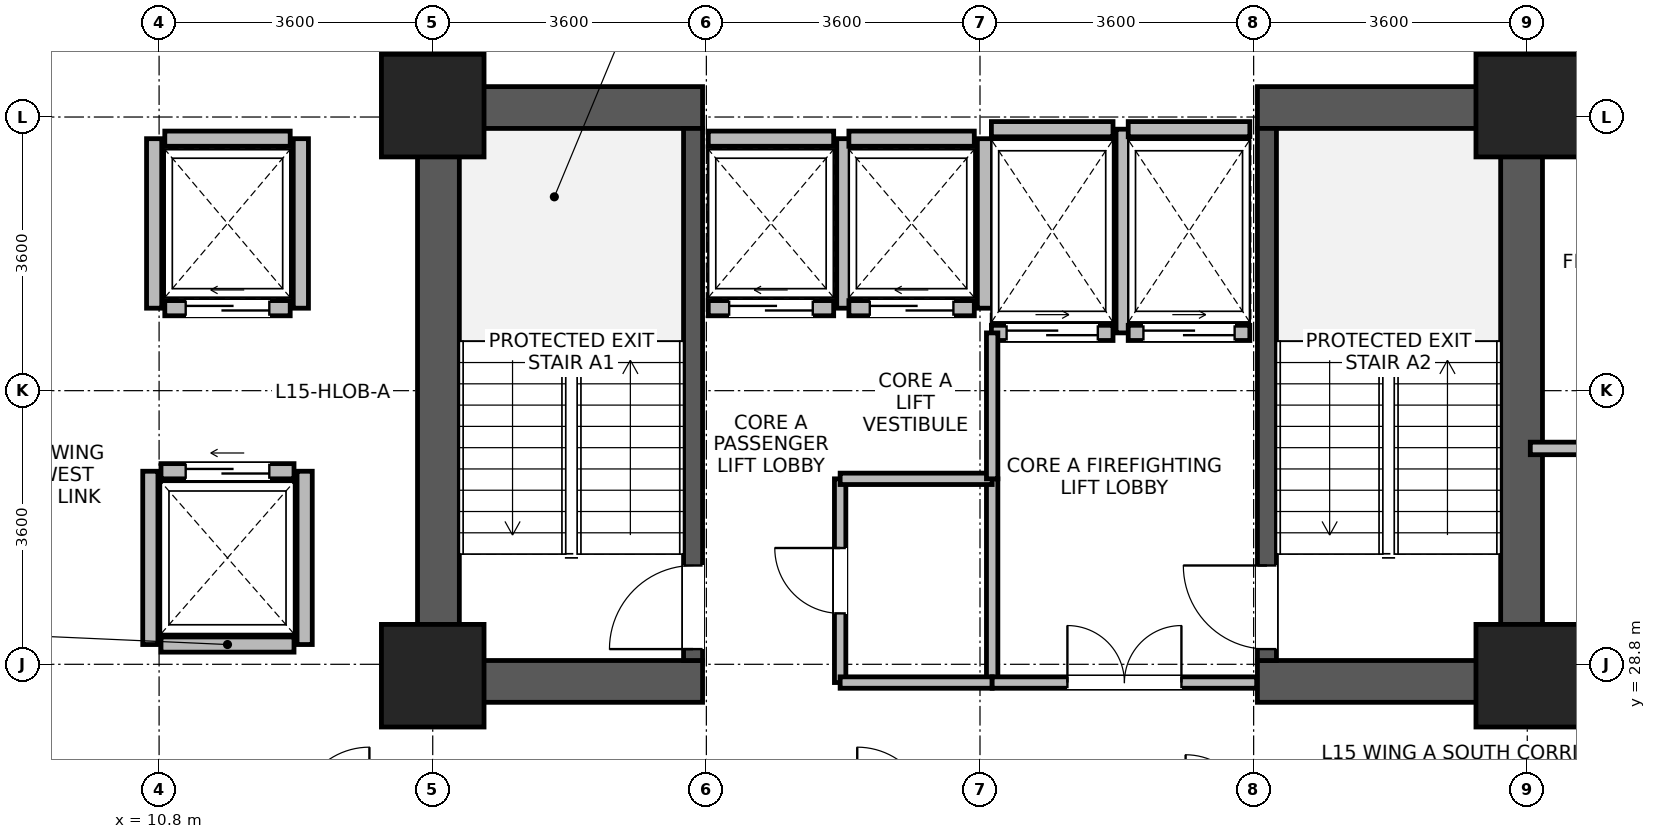
"""IFC4 building model, lengths in metres.
Left out: names, types, materials, properties, quantities, classifications, styles, units other than length and angle.
Written with IfcOpenShell. Run it as: python <this file> out.ifc"""

import sys

from ifc_helpers import new_model, si_unit, direction, frame, frame_2d, origin, origin_2d, place, context, subcontext, project, spatial, rectangle, extrude, source, transform, mapped, element, fill, save


model = new_model("IFC4")
c1 = context("Model", 3, precision=1e-05, world=origin(), true_north=direction((0.0, 1.0)))
c2 = subcontext(c1, "Body", "Model", "MODEL_VIEW")
j1 = project(units=[si_unit("LENGTHUNIT", "METRE"), si_unit("PLANEANGLEUNIT", "RADIAN")], contexts=[c1])
p1 = place(None, origin())
s1 = spatial("IfcSite", under=j1, at=p1, CompositionType="ELEMENT")
p2 = place(p1, origin())
s2 = spatial("IfcBuilding", under=s1, at=p2, CompositionType="ELEMENT")
p3 = place(p2, frame((0.0, 0.0, 62.3)))
s3 = spatial("IfcBuildingStorey", under=s2, at=p3, CompositionType="ELEMENT", Elevation=62.3)
for number, where, z_axis, x_axis in (
    (1, (14.475, 28.3, 0.0), (0.0, 0.0, 1.0), (0.0, 1.0, 0.0)),
    (2, (28.725, 28.3, 0.0), (0.0, 0.0, 1.0), (0.0, 1.0, 0.0)),
):
    element("IfcWall", number, at=place(p3, frame(where, z_axis=z_axis, x_axis=x_axis)), inside=s3, PredefinedType="SHEAR", context=c2, shape_type="SweptSolid", body=[
        extrude(rectangle(XDim=8.1, YDim=0.55, at=frame_2d((4.05, 0.0))), origin(), (0.0, 0.0, 1.0), 3.45),
    ])
for number, where, z_axis, x_axis in (
    (3, (14.75, 28.575, 0.0), (0.0, 0.0, 1.0), (1.0, 0.0, 0.0)),
    (4, (25.25, 28.575, 0.0), (0.0, 0.0, 1.0), (1.0, 0.0, 0.0)),
    (5, (14.75, 36.125, 0.0), (0.0, 0.0, 1.0), (1.0, 0.0, 0.0)),
    (6, (25.25, 36.125, 0.0), (0.0, 0.0, 1.0), (1.0, 0.0, 0.0)),
):
    element("IfcWall", number, at=place(p3, frame(where, z_axis=z_axis, x_axis=x_axis)), inside=s3, PredefinedType="SHEAR", context=c2, shape_type="SweptSolid", body=[
        extrude(rectangle(XDim=3.2, YDim=0.55, at=frame_2d((1.6, 0.0))), origin(), (0.0, 0.0, 1.0), 3.45),
    ])
p4 = place(p3, frame((17.825, 28.85, 0.0), z_axis=(0.0, 0.0, 1.0), x_axis=(0.0, 1.0, 0.0)))
e7 = element("IfcWall", 7, at=p4, inside=s3, PredefinedType="SHEAR", context=c2, shape_type="SweptSolid", body=[
    extrude(rectangle(XDim=7.0, YDim=0.25, at=frame_2d((3.5, 0.0))), origin(), (0.0, 0.0, 1.0), 3.45),
])
p5 = place(p4, frame((0.15, 0.0, 0.0)))
e8 = element("IfcOpeningElement", 8, at=p5, cuts=e7, PredefinedType="OPENING", context=c2, shape_type="SweptSolid", body=[
    extrude(rectangle(XDim=1.1, YDim=2.08, at=frame_2d((0.55, 1.04))), frame((0.0, 0.135, 0.0), z_axis=(0.0, -1.0, 0.0), x_axis=(1.0, 0.0, 0.0)), (0.0, 0.0, 1.0), 0.27),
])
p6 = place(p3, frame((25.375, 28.85, 0.0), z_axis=(0.0, 0.0, 1.0), x_axis=(0.0, 1.0, 0.0)))
e9 = element("IfcWall", 9, at=p6, inside=s3, PredefinedType="SHEAR", context=c2, shape_type="SweptSolid", body=[
    extrude(rectangle(XDim=7.0, YDim=0.25, at=frame_2d((3.5, 0.0))), origin(), (0.0, 0.0, 1.0), 3.45),
])
p7 = place(p6, frame((0.15, 0.0, 0.0)))
e10 = element("IfcOpeningElement", 10, at=p7, cuts=e9, PredefinedType="OPENING", context=c2, shape_type="SweptSolid", body=[
    extrude(rectangle(XDim=1.1, YDim=2.08, at=frame_2d((0.55, 1.04))), frame((0.0, 0.135, 0.0), z_axis=(0.0, -1.0, 0.0), x_axis=(1.0, 0.0, 0.0)), (0.0, 0.0, 1.0), 0.27),
])
m1 = source(origin(), c2, "Body", "SweptSolid", [
    extrude(rectangle(XDim=1.35, YDim=1.35, at=origin_2d()), origin(), (0.0, 0.0, 1.0), 3.7),
])
for number, where, z_axis, x_axis in (
    (11, (14.4, 28.65, 0.0), (0.0, 0.0, 1.0), (1.0, 0.0, 0.0)),
    (12, (14.4, 36.15, 0.0), (0.0, 0.0, 1.0), (1.0, 0.0, 0.0)),
    (13, (28.8, 28.65, 0.0), (0.0, 0.0, 1.0), (1.0, 0.0, 0.0)),
    (14, (28.8, 36.15, 0.0), (0.0, 0.0, 1.0), (1.0, 0.0, 0.0)),
):
    element("IfcColumn", number, at=place(p3, frame(where, z_axis=z_axis, x_axis=x_axis)), inside=s3, PredefinedType="COLUMN", context=c2, shape_type="MappedRepresentation", body=[
        mapped(m1, transform((0.0, 0.0, 0.0), x_axis=(1.0, 0.0, 0.0), y_axis=(0.0, 1.0, 0.0), z_axis=(0.0, 0.0, 1.0), scale=1.0)),
    ])
p8 = place(p3, frame((18.025, 33.485, 0.0), z_axis=(0.0, 0.0, 1.0), x_axis=(1.0, 0.0, 0.0)))
e15 = element("IfcWall", 15, at=p8, inside=s3, PredefinedType="PARTITIONING", context=c2, shape_type="SweptSolid", body=[
    extrude(rectangle(XDim=1.65, YDim=0.2, at=frame_2d((0.825, 0.0))), origin(), (0.0, 0.0, 1.0), 3.43),
])
p9 = place(p8, frame((0.275, 0.0, 0.0)))
e16 = element("IfcOpeningElement", 16, at=p9, cuts=e15, PredefinedType="OPENING", context=c2, shape_type="SweptSolid", body=[
    extrude(rectangle(XDim=1.1, YDim=2.12, at=frame_2d((0.55, 1.06))), frame((0.0, 0.11, 0.0), z_axis=(0.0, -1.0, 0.0), x_axis=(1.0, 0.0, 0.0)), (0.0, 0.0, 1.0), 0.22),
])
p10 = place(p3, frame((18.025, 35.715, 0.0), z_axis=(0.0, 0.0, 1.0), x_axis=(1.0, 0.0, 0.0)))
e17 = element("IfcWall", 17, at=p10, inside=s3, PredefinedType="PARTITIONING", context=c2, shape_type="SweptSolid", body=[
    extrude(rectangle(XDim=1.65, YDim=0.2, at=frame_2d((0.825, 0.0))), origin(), (0.0, 0.0, 1.0), 2.23),
])
p11 = place(p3, frame((19.815, 33.485, 0.0), z_axis=(0.0, 0.0, 1.0), x_axis=(0.0, 1.0, 0.0)))
e18 = element("IfcWall", 18, at=p11, inside=s3, PredefinedType="PARTITIONING", context=c2, shape_type="SweptSolid", body=[
    extrude(rectangle(XDim=2.23, YDim=0.2, at=frame_2d((1.115, 0.0))), origin(), (0.0, 0.0, 1.0), 3.43),
])
p12 = place(p3, frame((19.875, 33.485, 0.0), z_axis=(0.0, 0.0, 1.0), x_axis=(1.0, 0.0, 0.0)))
e19 = element("IfcWall", 19, at=p12, inside=s3, PredefinedType="PARTITIONING", context=c2, shape_type="SweptSolid", body=[
    extrude(rectangle(XDim=1.65, YDim=0.2, at=frame_2d((0.825, 0.0))), origin(), (0.0, 0.0, 1.0), 3.43),
])
p13 = place(p12, frame((0.275, 0.0, 0.0)))
e20 = element("IfcOpeningElement", 20, at=p13, cuts=e19, PredefinedType="OPENING", context=c2, shape_type="SweptSolid", body=[
    extrude(rectangle(XDim=1.1, YDim=2.12, at=frame_2d((0.55, 1.06))), frame((0.0, 0.11, 0.0), z_axis=(0.0, -1.0, 0.0), x_axis=(1.0, 0.0, 0.0)), (0.0, 0.0, 1.0), 0.22),
])
p14 = place(p3, frame((19.875, 35.715, 0.0), z_axis=(0.0, 0.0, 1.0), x_axis=(1.0, 0.0, 0.0)))
e21 = element("IfcWall", 21, at=p14, inside=s3, PredefinedType="PARTITIONING", context=c2, shape_type="SweptSolid", body=[
    extrude(rectangle(XDim=1.65, YDim=0.2, at=frame_2d((0.825, 0.0))), origin(), (0.0, 0.0, 1.0), 2.23),
])
p15 = place(p3, frame((21.665, 33.485, 0.0), z_axis=(0.0, 0.0, 1.0), x_axis=(0.0, 1.0, 0.0)))
e22 = element("IfcWall", 22, at=p15, inside=s3, PredefinedType="PARTITIONING", context=c2, shape_type="SweptSolid", body=[
    extrude(rectangle(XDim=2.23, YDim=0.2, at=frame_2d((1.115, 0.0))), origin(), (0.0, 0.0, 1.0), 3.43),
])
p16 = place(p3, frame((10.825, 29.06, 0.0), z_axis=(0.0, 0.0, 1.0), x_axis=(1.0, 0.0, 0.0)))
e23 = element("IfcWall", 23, at=p16, inside=s3, PredefinedType="PARTITIONING", context=c2, shape_type="SweptSolid", body=[
    extrude(rectangle(XDim=1.75, YDim=0.2, at=frame_2d((0.875, 0.0))), origin(), (0.0, 0.0, 1.0), 3.43),
])
p17 = place(p3, frame((10.825, 31.34, 0.0), z_axis=(0.0, 0.0, 1.0), x_axis=(1.0, 0.0, 0.0)))
e24 = element("IfcWall", 24, at=p17, inside=s3, PredefinedType="PARTITIONING", context=c2, shape_type="SweptSolid", body=[
    extrude(rectangle(XDim=1.75, YDim=0.2, at=frame_2d((0.875, 0.0))), origin(), (0.0, 0.0, 1.0), 3.43),
])
p18 = place(p17, frame((0.325, 0.0, 0.0)))
e25 = element("IfcOpeningElement", 25, at=p18, cuts=e24, PredefinedType="OPENING", context=c2, shape_type="SweptSolid", body=[
    extrude(rectangle(XDim=1.1, YDim=2.12, at=frame_2d((0.55, 1.06))), frame((0.0, 0.11, 0.0), z_axis=(0.0, -1.0, 0.0), x_axis=(1.0, 0.0, 0.0)), (0.0, 0.0, 1.0), 0.22),
])
for number, where, z_axis, x_axis in (
    (26, (10.685, 29.06, 0.0), (0.0, 0.0, 1.0), (0.0, 1.0, 0.0)),
    (27, (12.715, 29.06, 0.0), (0.0, 0.0, 1.0), (0.0, 1.0, 0.0)),
):
    element("IfcWall", number, at=place(p3, frame(where, z_axis=z_axis, x_axis=x_axis)), inside=s3, PredefinedType="PARTITIONING", context=c2, shape_type="SweptSolid", body=[
        extrude(rectangle(XDim=2.28, YDim=0.2, at=frame_2d((1.14, 0.0))), origin(), (0.0, 0.0, 1.0), 3.43),
    ])
p19 = place(p3, frame((10.875, 33.485, 0.0), z_axis=(0.0, 0.0, 1.0), x_axis=(1.0, 0.0, 0.0)))
e28 = element("IfcWall", 28, at=p19, inside=s3, PredefinedType="PARTITIONING", context=c2, shape_type="SweptSolid", body=[
    extrude(rectangle(XDim=1.65, YDim=0.2, at=frame_2d((0.825, 0.0))), origin(), (0.0, 0.0, 1.0), 3.43),
])
p20 = place(p19, frame((0.275, 0.0, 0.0)))
e29 = element("IfcOpeningElement", 29, at=p20, cuts=e28, PredefinedType="OPENING", context=c2, shape_type="SweptSolid", body=[
    extrude(rectangle(XDim=1.1, YDim=2.12, at=frame_2d((0.55, 1.06))), frame((0.0, 0.11, 0.0), z_axis=(0.0, -1.0, 0.0), x_axis=(1.0, 0.0, 0.0)), (0.0, 0.0, 1.0), 0.22),
])
p21 = place(p3, frame((10.875, 35.715, 0.0), z_axis=(0.0, 0.0, 1.0), x_axis=(1.0, 0.0, 0.0)))
e30 = element("IfcWall", 30, at=p21, inside=s3, PredefinedType="PARTITIONING", context=c2, shape_type="SweptSolid", body=[
    extrude(rectangle(XDim=1.65, YDim=0.2, at=frame_2d((0.825, 0.0))), origin(), (0.0, 0.0, 1.0), 3.43),
])
for number, where, z_axis, x_axis in (
    (31, (10.735, 33.485, 0.0), (0.0, 0.0, 1.0), (0.0, 1.0, 0.0)),
    (32, (12.665, 33.485, 0.0), (0.0, 0.0, 1.0), (0.0, 1.0, 0.0)),
):
    element("IfcWall", number, at=place(p3, frame(where, z_axis=z_axis, x_axis=x_axis)), inside=s3, PredefinedType="PARTITIONING", context=c2, shape_type="SweptSolid", body=[
        extrude(rectangle(XDim=2.23, YDim=0.2, at=frame_2d((1.115, 0.0))), origin(), (0.0, 0.0, 1.0), 3.43),
    ])
p22 = place(p3, frame((21.75, 33.16, 0.0), z_axis=(0.0, 0.0, 1.0), x_axis=(1.0, 0.0, 0.0)))
e33 = element("IfcWall", 33, at=p22, inside=s3, PredefinedType="PARTITIONING", context=c2, shape_type="SweptSolid", body=[
    extrude(rectangle(XDim=1.6, YDim=0.2, at=frame_2d((0.8, 0.0))), origin(), (0.0, 0.0, 1.0), 3.43),
])
p23 = place(p22, frame((0.2, 0.0, 0.0)))
e34 = element("IfcOpeningElement", 34, at=p23, cuts=e33, PredefinedType="OPENING", context=c2, shape_type="SweptSolid", body=[
    extrude(rectangle(XDim=1.2, YDim=2.12, at=frame_2d((0.6, 1.06))), frame((0.0, 0.11, 0.0), z_axis=(0.0, -1.0, 0.0), x_axis=(1.0, 0.0, 0.0)), (0.0, 0.0, 1.0), 0.22),
])
p24 = place(p3, frame((21.75, 35.84, 0.0), z_axis=(0.0, 0.0, 1.0), x_axis=(1.0, 0.0, 0.0)))
e35 = element("IfcWall", 35, at=p24, inside=s3, PredefinedType="PARTITIONING", context=c2, shape_type="SweptSolid", body=[
    extrude(rectangle(XDim=1.6, YDim=0.2, at=frame_2d((0.8, 0.0))), origin(), (0.0, 0.0, 1.0), 2.23),
])
p25 = place(p3, frame((23.49, 33.16, 0.0), z_axis=(0.0, 0.0, 1.0), x_axis=(0.0, 1.0, 0.0)))
e36 = element("IfcWall", 36, at=p25, inside=s3, PredefinedType="PARTITIONING", context=c2, shape_type="SweptSolid", body=[
    extrude(rectangle(XDim=2.68, YDim=0.2, at=frame_2d((1.34, 0.0))), origin(), (0.0, 0.0, 1.0), 3.43),
])
p26 = place(p3, frame((23.55, 33.16, 0.0), z_axis=(0.0, 0.0, 1.0), x_axis=(1.0, 0.0, 0.0)))
e37 = element("IfcWall", 37, at=p26, inside=s3, PredefinedType="PARTITIONING", context=c2, shape_type="SweptSolid", body=[
    extrude(rectangle(XDim=1.6, YDim=0.2, at=frame_2d((0.8, 0.0))), origin(), (0.0, 0.0, 1.0), 3.43),
])
p27 = place(p26, frame((0.2, 0.0, 0.0)))
e38 = element("IfcOpeningElement", 38, at=p27, cuts=e37, PredefinedType="OPENING", context=c2, shape_type="SweptSolid", body=[
    extrude(rectangle(XDim=1.2, YDim=2.12, at=frame_2d((0.6, 1.06))), frame((0.0, 0.11, 0.0), z_axis=(0.0, -1.0, 0.0), x_axis=(1.0, 0.0, 0.0)), (0.0, 0.0, 1.0), 0.22),
])
p28 = place(p3, frame((23.55, 35.84, 0.0), z_axis=(0.0, 0.0, 1.0), x_axis=(1.0, 0.0, 0.0)))
e39 = element("IfcWall", 39, at=p28, inside=s3, PredefinedType="PARTITIONING", context=c2, shape_type="SweptSolid", body=[
    extrude(rectangle(XDim=1.6, YDim=0.2, at=frame_2d((0.8, 0.0))), origin(), (0.0, 0.0, 1.0), 2.23),
])
p29 = place(p3, frame((19.76, 28.56, 0.0), z_axis=(0.0, 0.0, 1.0), x_axis=(0.0, 1.0, 0.0)))
e40 = element("IfcWall", 40, at=p29, inside=s3, PredefinedType="PARTITIONING", context=c2, shape_type="SweptSolid", body=[
    extrude(rectangle(XDim=2.68, YDim=0.15, at=frame_2d((1.34, 0.0))), origin(), (0.0, 0.0, 1.0), 3.43),
])
p30 = place(p29, frame((0.91, 0.0, 0.0)))
e41 = element("IfcOpeningElement", 41, at=p30, cuts=e40, PredefinedType="OPENING", context=c2, shape_type="SweptSolid", body=[
    extrude(rectangle(XDim=0.86, YDim=2.02, at=frame_2d((0.43, 1.01))), frame((0.0, 0.085, 0.0), z_axis=(0.0, -1.0, 0.0), x_axis=(1.0, 0.0, 0.0)), (0.0, 0.0, 1.0), 0.17),
])
p31 = place(p3, frame((21.76, 28.56, 0.0), z_axis=(0.0, 0.0, 1.0), x_axis=(0.0, 1.0, 0.0)))
e42 = element("IfcWall", 42, at=p31, inside=s3, PredefinedType="PARTITIONING", context=c2, shape_type="SweptSolid", body=[
    extrude(rectangle(XDim=2.68, YDim=0.15, at=frame_2d((1.34, 0.0))), origin(), (0.0, 0.0, 1.0), 3.43),
])
p32 = place(p3, frame((19.76, 28.56, 0.0), z_axis=(0.0, 0.0, 1.0), x_axis=(1.0, 0.0, 0.0)))
e43 = element("IfcWall", 43, at=p32, inside=s3, PredefinedType="PARTITIONING", context=c2, shape_type="SweptSolid", body=[
    extrude(rectangle(XDim=2.0, YDim=0.15, at=frame_2d((1.0, 0.0))), origin(), (0.0, 0.0, 1.0), 2.23),
])
p33 = place(p3, frame((19.76, 31.24, 0.0), z_axis=(0.0, 0.0, 1.0), x_axis=(1.0, 0.0, 0.0)))
e44 = element("IfcWall", 44, at=p33, inside=s3, PredefinedType="PARTITIONING", context=c2, shape_type="SweptSolid", body=[
    extrude(rectangle(XDim=2.0, YDim=0.15, at=frame_2d((1.0, 0.0))), origin(), (0.0, 0.0, 1.0), 3.43),
])
p34 = place(p3, frame((28.84, 31.64, 0.0), z_axis=(0.0, 0.0, 1.0), x_axis=(1.0, 0.0, 0.0)))
e45 = element("IfcWall", 45, at=p34, inside=s3, PredefinedType="PARTITIONING", context=c2, shape_type="SweptSolid", body=[
    extrude(rectangle(XDim=4.52, YDim=0.165, at=frame_2d((2.26, 0.0))), origin(), (0.0, 0.0, 1.0), 3.43),
])
p35 = place(p3, frame((21.76, 28.56, 0.0), z_axis=(0.0, 0.0, 1.0), x_axis=(1.0, 0.0, 0.0)))
e46 = element("IfcWall", 46, at=p35, inside=s3, PredefinedType="PARTITIONING", context=c2, shape_type="SweptSolid", body=[
    extrude(rectangle(XDim=3.48, YDim=0.15, at=frame_2d((1.74, 0.0))), origin(), (0.0, 0.0, 1.0), 2.23),
])
p36 = place(p35, frame((0.99, 0.0, 0.0)))
e47 = element("IfcOpeningElement", 47, at=p36, cuts=e46, PredefinedType="OPENING", context=c2, shape_type="SweptSolid", body=[
    extrude(rectangle(XDim=1.5, YDim=2.1, at=frame_2d((0.75, 1.05))), frame((0.0, 0.085, 0.0), z_axis=(0.0, -1.0, 0.0), x_axis=(1.0, 0.0, 0.0)), (0.0, 0.0, 1.0), 0.17),
])
p37 = place(p3, frame((21.76, 31.24, 0.0), z_axis=(0.0, 0.0, 1.0), x_axis=(0.0, 1.0, 0.0)))
e48 = element("IfcWall", 48, at=p37, inside=s3, PredefinedType="PARTITIONING", context=c2, shape_type="SweptSolid", body=[
    extrude(rectangle(XDim=1.92, YDim=0.15, at=frame_2d((0.96, 0.0))), origin(), (0.0, 0.0, 1.0), 3.43),
])
p38 = place(p5, origin())
e49 = element("IfcDoor", 49, at=p38, inside=s3, OperationType="SINGLE_SWING_LEFT", PredefinedType="DOOR", context=c2, shape_type="SweptSolid", body=[
    extrude(rectangle(XDim=1.1, YDim=2.08, at=frame_2d((0.55, 1.04))), frame((0.0, 0.025, 0.0), z_axis=(0.0, -1.0, 0.0), x_axis=(1.0, 0.0, 0.0)), (0.0, 0.0, 1.0), 0.05),
])
fill(e8, e49)
p39 = place(p7, origin())
e50 = element("IfcDoor", 50, at=p39, inside=s3, OperationType="SINGLE_SWING_RIGHT", PredefinedType="DOOR", context=c2, shape_type="SweptSolid", body=[
    extrude(rectangle(XDim=1.1, YDim=2.08, at=frame_2d((0.55, 1.04))), frame((0.0, 0.025, 0.0), z_axis=(0.0, -1.0, 0.0), x_axis=(1.0, 0.0, 0.0)), (0.0, 0.0, 1.0), 0.05),
])
fill(e10, e50)
p40 = place(p9, origin())
e51 = element("IfcDoor", 51, at=p40, inside=s3, OperationType="SLIDING_TO_LEFT", PredefinedType="DOOR", context=c2, shape_type="SweptSolid", body=[
    extrude(rectangle(XDim=1.1, YDim=2.12, at=frame_2d((0.55, 1.06))), frame((0.0, 0.025, 0.0), z_axis=(0.0, -1.0, 0.0), x_axis=(1.0, 0.0, 0.0)), (0.0, 0.0, 1.0), 0.05),
])
fill(e16, e51)
p41 = place(p13, origin())
e52 = element("IfcDoor", 52, at=p41, inside=s3, OperationType="SLIDING_TO_LEFT", PredefinedType="DOOR", context=c2, shape_type="SweptSolid", body=[
    extrude(rectangle(XDim=1.1, YDim=2.12, at=frame_2d((0.55, 1.06))), frame((0.0, 0.025, 0.0), z_axis=(0.0, -1.0, 0.0), x_axis=(1.0, 0.0, 0.0)), (0.0, 0.0, 1.0), 0.05),
])
fill(e20, e52)
p42 = place(p18, origin())
e53 = element("IfcDoor", 53, at=p42, inside=s3, OperationType="SLIDING_TO_LEFT", PredefinedType="DOOR", context=c2, shape_type="SweptSolid", body=[
    extrude(rectangle(XDim=1.1, YDim=2.12, at=frame_2d((0.55, 1.06))), frame((0.0, 0.025, 0.0), z_axis=(0.0, -1.0, 0.0), x_axis=(1.0, 0.0, 0.0)), (0.0, 0.0, 1.0), 0.05),
])
fill(e25, e53)
p43 = place(p20, origin())
e54 = element("IfcDoor", 54, at=p43, inside=s3, OperationType="SLIDING_TO_LEFT", PredefinedType="DOOR", context=c2, shape_type="SweptSolid", body=[
    extrude(rectangle(XDim=1.1, YDim=2.12, at=frame_2d((0.55, 1.06))), frame((0.0, 0.025, 0.0), z_axis=(0.0, -1.0, 0.0), x_axis=(1.0, 0.0, 0.0)), (0.0, 0.0, 1.0), 0.05),
])
fill(e29, e54)
p44 = place(p23, origin())
e55 = element("IfcDoor", 55, at=p44, inside=s3, OperationType="SLIDING_TO_RIGHT", PredefinedType="DOOR", context=c2, shape_type="SweptSolid", body=[
    extrude(rectangle(XDim=1.2, YDim=2.12, at=frame_2d((0.6, 1.06))), frame((0.0, 0.025, 0.0), z_axis=(0.0, -1.0, 0.0), x_axis=(1.0, 0.0, 0.0)), (0.0, 0.0, 1.0), 0.05),
])
fill(e34, e55)
p45 = place(p27, origin())
e56 = element("IfcDoor", 56, at=p45, inside=s3, OperationType="SLIDING_TO_RIGHT", PredefinedType="DOOR", context=c2, shape_type="SweptSolid", body=[
    extrude(rectangle(XDim=1.2, YDim=2.12, at=frame_2d((0.6, 1.06))), frame((0.0, 0.025, 0.0), z_axis=(0.0, -1.0, 0.0), x_axis=(1.0, 0.0, 0.0)), (0.0, 0.0, 1.0), 0.05),
])
fill(e38, e56)
p46 = place(p30, origin())
e57 = element("IfcDoor", 57, at=p46, inside=s3, OperationType="SINGLE_SWING_RIGHT", PredefinedType="DOOR", context=c2, shape_type="SweptSolid", body=[
    extrude(rectangle(XDim=0.86, YDim=2.02, at=frame_2d((0.43, 1.01))), frame((0.0, 0.025, 0.0), z_axis=(0.0, -1.0, 0.0), x_axis=(1.0, 0.0, 0.0)), (0.0, 0.0, 1.0), 0.05),
])
fill(e41, e57)
p47 = place(p36, origin())
e58 = element("IfcDoor", 58, at=p47, inside=s3, OperationType="DOUBLE_DOOR_SINGLE_SWING", PredefinedType="DOOR", context=c2, shape_type="SweptSolid", body=[
    extrude(rectangle(XDim=1.5, YDim=2.1, at=frame_2d((0.75, 1.05))), frame((0.0, 0.025, 0.0), z_axis=(0.0, -1.0, 0.0), x_axis=(1.0, 0.0, 0.0)), (0.0, 0.0, 1.0), 0.05),
])
fill(e47, e58)
save(model, sys.argv[1])
